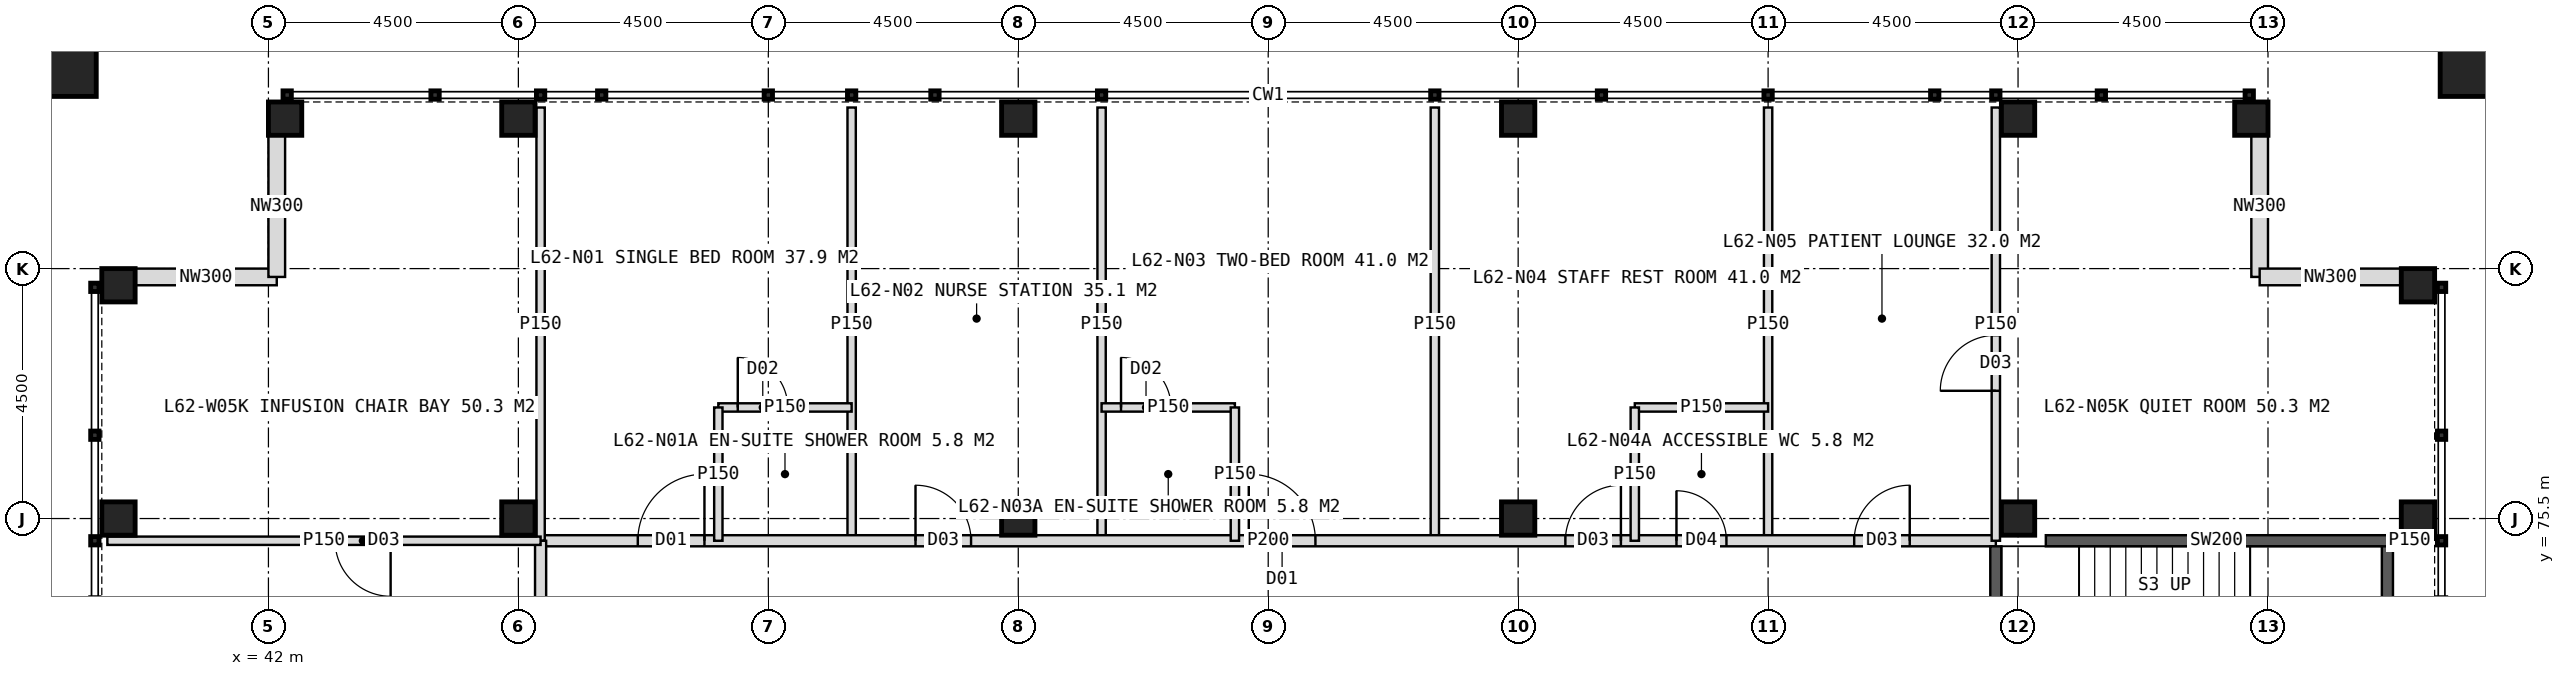
"""IFC4 building model, lengths in metres.
Left out: names, types, materials, properties, quantities, classifications, styles, units other than length and angle.
Written with IfcOpenShell. Run it as: python <this file> out.ifc"""

import sys

from ifc_helpers import new_model, si_unit, direction, frame, frame_2d, origin, origin_2d, place, context, subcontext, project, spatial, rectangle, hollow_rectangle, extrude, element, fill, save


model = new_model("IFC4")
c1 = context("Model", 3, precision=1e-05, world=origin(), true_north=direction((0.0, 1.0)))
c2 = subcontext(c1, "Body", "Model", "MODEL_VIEW")
j1 = project(units=[si_unit("LENGTHUNIT", "METRE"), si_unit("PLANEANGLEUNIT", "RADIAN")], contexts=[c1])
p1 = place(None, origin())
s1 = spatial("IfcSite", under=j1, at=p1, CompositionType="ELEMENT")
p2 = place(p1, origin())
s2 = spatial("IfcBuilding", under=s1, at=p2, CompositionType="ELEMENT")
p3 = place(p2, frame((0.0, 0.0, 258.0)))
s3 = spatial("IfcBuildingStorey", under=s2, at=p3, CompositionType="ELEMENT", Elevation=258.0)
for number, where, z_axis, x_axis in (
    (1, (73.5, 75.5, 0.0), (0.0, 0.0, 1.0), (1.0, 0.0, 0.0)),
    (2, (46.5, 75.5, 0.0), (0.0, 0.0, 1.0), (1.0, 0.0, 0.0)),
    (3, (55.5, 75.5, 0.0), (0.0, 0.0, 1.0), (1.0, 0.0, 0.0)),
    (4, (64.5, 75.5, 0.0), (0.0, 0.0, 1.0), (1.0, 0.0, 0.0)),
    (5, (42.3, 82.7, 0.0), (0.0, 0.0, 1.0), (1.0, 0.0, 0.0)),
    (6, (46.5, 82.7, 0.0), (0.0, 0.0, 1.0), (1.0, 0.0, 0.0)),
    (7, (55.5, 82.7, 0.0), (0.0, 0.0, 1.0), (1.0, 0.0, 0.0)),
    (8, (64.5, 82.7, 0.0), (0.0, 0.0, 1.0), (1.0, 0.0, 0.0)),
    (9, (73.5, 82.7, 0.0), (0.0, 0.0, 1.0), (1.0, 0.0, 0.0)),
    (10, (39.3, 75.5, 0.0), (0.0, 0.0, 1.0), (1.0, 0.0, 0.0)),
    (11, (80.7, 75.5, 0.0), (0.0, 0.0, 1.0), (1.0, 0.0, 0.0)),
    (12, (77.7, 82.7, 0.0), (0.0, 0.0, 1.0), (1.0, 0.0, 0.0)),
    (13, (39.3, 79.7, 0.0), (0.0, 0.0, 1.0), (1.0, 0.0, 0.0)),
    (14, (80.7, 79.7, 0.0), (0.0, 0.0, 1.0), (1.0, 0.0, 0.0)),
):
    element("IfcColumn", number, at=place(p3, frame(where, z_axis=z_axis, x_axis=x_axis)), inside=s3, PredefinedType="COLUMN", context=c2, shape_type="SweptSolid", body=[
        extrude(hollow_rectangle(XDim=0.6, YDim=0.6, WallThickness=0.04, at=origin_2d()), origin(), (0.0, 0.0, 1.0), 4.0),
    ])
for number, where, z_axis, x_axis in (
    (15, (81.6, 83.6, 0.0), (0.0, 0.0, 1.0), (1.0, 0.0, 0.0)),
    (16, (38.4, 83.6, 0.0), (0.0, 0.0, 1.0), (1.0, 0.0, 0.0)),
):
    element("IfcColumn", number, at=place(p3, frame(where, z_axis=z_axis, x_axis=x_axis)), inside=s3, PredefinedType="COLUMN", context=c2, shape_type="SweptSolid", body=[
        extrude(hollow_rectangle(XDim=1.0, YDim=1.0, WallThickness=0.06, at=origin_2d()), origin(), (0.0, 0.0, 1.0), 4.0),
    ])
for number, where, z_axis, x_axis in (
    (17, (77.85, 82.4, 0.0), (0.0, 0.0, 1.0), (0.0, -1.0, 0.0)),
    (18, (77.85, 79.85, 0.0), (0.0, 0.0, 1.0), (1.0, 0.0, 0.0)),
    (19, (39.6, 79.85, 0.0), (0.0, 0.0, 1.0), (1.0, 0.0, 0.0)),
    (20, (42.15, 79.85, 0.0), (0.0, 0.0, 1.0), (0.0, 1.0, 0.0)),
):
    element("IfcWall", number, at=place(p3, frame(where, z_axis=z_axis, x_axis=x_axis)), inside=s3, PredefinedType="ELEMENTEDWALL", context=c2, shape_type="SweptSolid", body=[
        extrude(rectangle(XDim=2.55, YDim=0.3, at=frame_2d((1.275, 0.0))), origin(), (0.0, 0.0, 1.0), 2.95),
    ])
for number, where, z_axis, x_axis in (
    (21, (52.5, 75.1, 0.0), (0.0, 0.0, 1.0), (0.0, 1.0, 0.0)),
    (22, (57.0, 75.1, 0.0), (0.0, 0.0, 1.0), (0.0, 1.0, 0.0)),
    (23, (63.0, 75.1, 0.0), (0.0, 0.0, 1.0), (0.0, 1.0, 0.0)),
    (24, (69.0, 75.1, 0.0), (0.0, 0.0, 1.0), (0.0, 1.0, 0.0)),
):
    element("IfcWall", number, at=place(p3, frame(where, z_axis=z_axis, x_axis=x_axis)), inside=s3, PredefinedType="PARTITIONING", context=c2, shape_type="SweptSolid", body=[
        extrude(rectangle(XDim=7.8, YDim=0.15, at=frame_2d((3.9, 0.0))), origin(), (0.0, 0.0, 1.0), 3.75),
    ])
p4 = place(p3, frame((46.9, 75.1, 0.0), z_axis=(0.0, 0.0, 1.0), x_axis=(1.0, 0.0, 0.0)))
e25 = element("IfcWall", 25, at=p4, inside=s3, PredefinedType="PARTITIONING", context=c2, shape_type="SweptSolid", body=[
    extrude(rectangle(XDim=26.2, YDim=0.2, at=frame_2d((13.1, 0.0))), origin(), (0.0, 0.0, 1.0), 3.75),
])
p5 = place(p4, frame((1.75, 0.0, 0.0)))
e26 = element("IfcOpeningElement", 26, at=p5, cuts=e25, PredefinedType="OPENING", context=c2, shape_type="SweptSolid", body=[
    extrude(rectangle(XDim=1.2, YDim=2.2, at=frame_2d((0.6, 1.1))), frame((0.0, 0.11, 0.0), z_axis=(0.0, -1.0, 0.0), x_axis=(1.0, 0.0, 0.0)), (0.0, 0.0, 1.0), 0.22),
])
p6 = place(p4, frame((6.75, 0.0, 0.0)))
e27 = element("IfcOpeningElement", 27, at=p6, cuts=e25, PredefinedType="OPENING", context=c2, shape_type="SweptSolid", body=[
    extrude(rectangle(XDim=1.0, YDim=2.1, at=frame_2d((0.5, 1.05))), frame((0.0, 0.11, 0.0), z_axis=(0.0, -1.0, 0.0), x_axis=(1.0, 0.0, 0.0)), (0.0, 0.0, 1.0), 0.22),
])
p7 = place(p4, frame((12.75, 0.0, 0.0)))
e28 = element("IfcOpeningElement", 28, at=p7, cuts=e25, PredefinedType="OPENING", context=c2, shape_type="SweptSolid", body=[
    extrude(rectangle(XDim=1.2, YDim=2.2, at=frame_2d((0.6, 1.1))), frame((0.0, 0.11, 0.0), z_axis=(0.0, -1.0, 0.0), x_axis=(1.0, 0.0, 0.0)), (0.0, 0.0, 1.0), 0.22),
])
p8 = place(p4, frame((20.45, 0.0, 0.0)))
e29 = element("IfcOpeningElement", 29, at=p8, cuts=e25, PredefinedType="OPENING", context=c2, shape_type="SweptSolid", body=[
    extrude(rectangle(XDim=0.9, YDim=2.1, at=frame_2d((0.45, 1.05))), frame((0.0, 0.11, 0.0), z_axis=(0.0, -1.0, 0.0), x_axis=(1.0, 0.0, 0.0)), (0.0, 0.0, 1.0), 0.22),
])
p9 = place(p4, frame((18.45, 0.0, 0.0)))
e30 = element("IfcOpeningElement", 30, at=p9, cuts=e25, PredefinedType="OPENING", context=c2, shape_type="SweptSolid", body=[
    extrude(rectangle(XDim=1.0, YDim=2.1, at=frame_2d((0.5, 1.05))), frame((0.0, 0.11, 0.0), z_axis=(0.0, -1.0, 0.0), x_axis=(1.0, 0.0, 0.0)), (0.0, 0.0, 1.0), 0.22),
])
p10 = place(p4, frame((23.65, 0.0, 0.0)))
e31 = element("IfcOpeningElement", 31, at=p10, cuts=e25, PredefinedType="OPENING", context=c2, shape_type="SweptSolid", body=[
    extrude(rectangle(XDim=1.0, YDim=2.1, at=frame_2d((0.5, 1.05))), frame((0.0, 0.11, 0.0), z_axis=(0.0, -1.0, 0.0), x_axis=(1.0, 0.0, 0.0)), (0.0, 0.0, 1.0), 0.22),
])
p11 = place(p3, frame((46.9, 75.1, 0.0), z_axis=(0.0, 0.0, 1.0), x_axis=(0.0, 1.0, 0.0)))
e32 = element("IfcWall", 32, at=p11, inside=s3, PredefinedType="PARTITIONING", context=c2, shape_type="SweptSolid", body=[
    extrude(rectangle(XDim=7.8, YDim=0.15, at=frame_2d((3.9, 0.0))), origin(), (0.0, 0.0, 1.0), 3.75),
])
p12 = place(p3, frame((50.1, 77.5, 0.0), z_axis=(0.0, 0.0, 1.0), x_axis=(1.0, 0.0, 0.0)))
e33 = element("IfcWall", 33, at=p12, inside=s3, PredefinedType="PARTITIONING", context=c2, shape_type="SweptSolid", body=[
    extrude(rectangle(XDim=2.4, YDim=0.15, at=frame_2d((1.2, 0.0))), origin(), (0.0, 0.0, 1.0), 3.75),
])
p13 = place(p12, frame((0.35, 0.0, 0.0)))
e34 = element("IfcOpeningElement", 34, at=p13, cuts=e33, PredefinedType="OPENING", context=c2, shape_type="SweptSolid", body=[
    extrude(rectangle(XDim=0.9, YDim=2.1, at=frame_2d((0.45, 1.05))), frame((0.0, 0.085, 0.0), z_axis=(0.0, -1.0, 0.0), x_axis=(1.0, 0.0, 0.0)), (0.0, 0.0, 1.0), 0.17),
])
p14 = place(p3, frame((50.1, 75.1, 0.0), z_axis=(0.0, 0.0, 1.0), x_axis=(0.0, 1.0, 0.0)))
e35 = element("IfcWall", 35, at=p14, inside=s3, PredefinedType="PARTITIONING", context=c2, shape_type="SweptSolid", body=[
    extrude(rectangle(XDim=2.4, YDim=0.15, at=frame_2d((1.2, 0.0))), origin(), (0.0, 0.0, 1.0), 3.75),
])
p15 = place(p3, frame((57.0, 77.5, 0.0), z_axis=(0.0, 0.0, 1.0), x_axis=(1.0, 0.0, 0.0)))
e36 = element("IfcWall", 36, at=p15, inside=s3, PredefinedType="PARTITIONING", context=c2, shape_type="SweptSolid", body=[
    extrude(rectangle(XDim=2.4, YDim=0.15, at=frame_2d((1.2, 0.0))), origin(), (0.0, 0.0, 1.0), 3.75),
])
p16 = place(p15, frame((0.35, 0.0, 0.0)))
e37 = element("IfcOpeningElement", 37, at=p16, cuts=e36, PredefinedType="OPENING", context=c2, shape_type="SweptSolid", body=[
    extrude(rectangle(XDim=0.9, YDim=2.1, at=frame_2d((0.45, 1.05))), frame((0.0, 0.085, 0.0), z_axis=(0.0, -1.0, 0.0), x_axis=(1.0, 0.0, 0.0)), (0.0, 0.0, 1.0), 0.17),
])
for number, where, z_axis, x_axis in (
    (38, (59.4, 75.1, 0.0), (0.0, 0.0, 1.0), (0.0, 1.0, 0.0)),
    (39, (66.6, 77.5, 0.0), (0.0, 0.0, 1.0), (1.0, 0.0, 0.0)),
    (40, (66.6, 75.1, 0.0), (0.0, 0.0, 1.0), (0.0, 1.0, 0.0)),
):
    element("IfcWall", number, at=place(p3, frame(where, z_axis=z_axis, x_axis=x_axis)), inside=s3, PredefinedType="PARTITIONING", context=c2, shape_type="SweptSolid", body=[
        extrude(rectangle(XDim=2.4, YDim=0.15, at=frame_2d((1.2, 0.0))), origin(), (0.0, 0.0, 1.0), 3.75),
    ])
p17 = place(p3, frame((73.1, 75.1, 0.0), z_axis=(0.0, 0.0, 1.0), x_axis=(0.0, 1.0, 0.0)))
e41 = element("IfcWall", 41, at=p17, inside=s3, PredefinedType="PARTITIONING", context=c2, shape_type="SweptSolid", body=[
    extrude(rectangle(XDim=7.8, YDim=0.15, at=frame_2d((3.9, 0.0))), origin(), (0.0, 0.0, 1.0), 3.75),
])
p18 = place(p17, frame((2.7, 0.0, 0.0)))
e42 = element("IfcOpeningElement", 42, at=p18, cuts=e41, PredefinedType="OPENING", context=c2, shape_type="SweptSolid", body=[
    extrude(rectangle(XDim=1.0, YDim=2.1, at=frame_2d((0.5, 1.05))), frame((0.0, 0.085, 0.0), z_axis=(0.0, -1.0, 0.0), x_axis=(1.0, 0.0, 0.0)), (0.0, 0.0, 1.0), 0.17),
])
p19 = place(p3, frame((46.9, 48.9, 0.0), z_axis=(0.0, 0.0, 1.0), x_axis=(0.0, 1.0, 0.0)))
e43 = element("IfcWall", 43, at=p19, inside=s3, PredefinedType="PARTITIONING", context=c2, shape_type="SweptSolid", body=[
    extrude(rectangle(XDim=26.2, YDim=0.2, at=frame_2d((13.1, 0.0))), origin(), (0.0, 0.0, 1.0), 3.75),
])
p20 = place(p19, frame((1.75, 0.0, 0.0)))
e44 = element("IfcOpeningElement", 44, at=p20, cuts=e43, PredefinedType="OPENING", context=c2, shape_type="SweptSolid", body=[
    extrude(rectangle(XDim=1.2, YDim=2.2, at=frame_2d((0.6, 1.1))), frame((0.0, 0.11, 0.0), z_axis=(0.0, -1.0, 0.0), x_axis=(1.0, 0.0, 0.0)), (0.0, 0.0, 1.0), 0.22),
])
p21 = place(p19, frame((6.75, 0.0, 0.0)))
e45 = element("IfcOpeningElement", 45, at=p21, cuts=e43, PredefinedType="OPENING", context=c2, shape_type="SweptSolid", body=[
    extrude(rectangle(XDim=1.0, YDim=2.1, at=frame_2d((0.5, 1.05))), frame((0.0, 0.11, 0.0), z_axis=(0.0, -1.0, 0.0), x_axis=(1.0, 0.0, 0.0)), (0.0, 0.0, 1.0), 0.22),
])
p22 = place(p19, frame((11.1, 0.0, 0.0)))
e46 = element("IfcOpeningElement", 46, at=p22, cuts=e43, PredefinedType="OPENING", context=c2, shape_type="SweptSolid", body=[
    extrude(rectangle(XDim=1.0, YDim=2.1, at=frame_2d((0.5, 1.05))), frame((0.0, 0.11, 0.0), z_axis=(0.0, -1.0, 0.0), x_axis=(1.0, 0.0, 0.0)), (0.0, 0.0, 1.0), 0.22),
])
p23 = place(p19, frame((18.45, 0.0, 0.0)))
e47 = element("IfcOpeningElement", 47, at=p23, cuts=e43, PredefinedType="OPENING", context=c2, shape_type="SweptSolid", body=[
    extrude(rectangle(XDim=1.2, YDim=2.2, at=frame_2d((0.6, 1.1))), frame((0.0, 0.11, 0.0), z_axis=(0.0, -1.0, 0.0), x_axis=(1.0, 0.0, 0.0)), (0.0, 0.0, 1.0), 0.22),
])
p24 = place(p19, frame((23.25, 0.0, 0.0)))
e48 = element("IfcOpeningElement", 48, at=p24, cuts=e43, PredefinedType="OPENING", context=c2, shape_type="SweptSolid", body=[
    extrude(rectangle(XDim=1.2, YDim=2.2, at=frame_2d((0.6, 1.1))), frame((0.0, 0.11, 0.0), z_axis=(0.0, -1.0, 0.0), x_axis=(1.0, 0.0, 0.0)), (0.0, 0.0, 1.0), 0.22),
])
p25 = place(p3, frame((46.9, 75.1, 0.0), z_axis=(0.0, 0.0, 1.0), x_axis=(-1.0, 0.0, 0.0)))
e49 = element("IfcWall", 49, at=p25, inside=s3, PredefinedType="PARTITIONING", context=c2, shape_type="SweptSolid", body=[
    extrude(rectangle(XDim=7.8, YDim=0.15, at=frame_2d((3.9, 0.0))), origin(), (0.0, 0.0, 1.0), 3.75),
])
p26 = place(p25, frame((2.7, 0.0, 0.0)))
e50 = element("IfcOpeningElement", 50, at=p26, cuts=e49, PredefinedType="OPENING", context=c2, shape_type="SweptSolid", body=[
    extrude(rectangle(XDim=1.0, YDim=2.1, at=frame_2d((0.5, 1.05))), frame((0.0, 0.085, 0.0), z_axis=(0.0, -1.0, 0.0), x_axis=(1.0, 0.0, 0.0)), (0.0, 0.0, 1.0), 0.17),
])
p27 = place(p3, frame((80.2, 75.1, 0.0), z_axis=(0.0, 0.0, 1.0), x_axis=(1.0, 0.0, 0.0)))
e51 = element("IfcWall", 51, at=p27, inside=s3, PredefinedType="PARTITIONING", context=c2, shape_type="SweptSolid", body=[
    extrude(rectangle(XDim=0.7, YDim=0.15, at=frame_2d((0.35, 0.0))), origin(), (0.0, 0.0, 1.0), 3.75),
])
p28 = place(p3, frame((73.1, 75.0, 0.0), z_axis=(0.0, 0.0, 1.0), x_axis=(0.0, -1.0, 0.0)))
e52 = element("IfcWall", 52, at=p28, inside=s3, PredefinedType="SOLIDWALL", context=c2, shape_type="SweptSolid", body=[
    extrude(rectangle(XDim=4.0, YDim=0.2, at=frame_2d((2.0, 0.0))), origin(), (0.0, 0.0, 1.0), 3.75),
])
p29 = place(p28, frame((1.5, 0.0, 0.0)))
e53 = element("IfcOpeningElement", 53, at=p29, cuts=e52, PredefinedType="OPENING", context=c2, shape_type="SweptSolid", body=[
    extrude(rectangle(XDim=1.2, YDim=2.1, at=frame_2d((0.6, 1.05))), frame((0.0, 0.11, 0.0), z_axis=(0.0, -1.0, 0.0), x_axis=(1.0, 0.0, 0.0)), (0.0, 0.0, 1.0), 0.22),
])
p30 = place(p3, frame((80.15, 71.0, 0.0), z_axis=(0.0, 0.0, 1.0), x_axis=(0.0, 1.0, 0.0)))
e54 = element("IfcWall", 54, at=p30, inside=s3, PredefinedType="SOLIDWALL", context=c2, shape_type="SweptSolid", body=[
    extrude(rectangle(XDim=4.1, YDim=0.2, at=frame_2d((2.05, 0.0))), origin(), (0.0, 0.0, 1.0), 3.75),
])
p31 = place(p3, frame((74.0, 75.1, 0.0), z_axis=(0.0, 0.0, 1.0), x_axis=(1.0, 0.0, 0.0)))
e55 = element("IfcWall", 55, at=p31, inside=s3, PredefinedType="SOLIDWALL", context=c2, shape_type="SweptSolid", body=[
    extrude(rectangle(XDim=6.15, YDim=0.2, at=frame_2d((3.075, 0.0))), origin(), (0.0, 0.0, 1.0), 3.75),
])
p32 = place(p5, origin())
e56 = element("IfcDoor", 56, at=p32, inside=s3, OperationType="SINGLE_SWING_RIGHT", PredefinedType="DOOR", context=c2, shape_type="SweptSolid", body=[
    extrude(rectangle(XDim=1.2, YDim=2.2, at=frame_2d((0.6, 1.1))), frame((0.0, 0.025, 0.0), z_axis=(0.0, -1.0, 0.0), x_axis=(1.0, 0.0, 0.0)), (0.0, 0.0, 1.0), 0.05),
])
fill(e26, e56)
p33 = place(p13, origin())
e57 = element("IfcDoor", 57, at=p33, inside=s3, OperationType="SINGLE_SWING_LEFT", PredefinedType="DOOR", context=c2, shape_type="SweptSolid", body=[
    extrude(rectangle(XDim=0.9, YDim=2.1, at=frame_2d((0.45, 1.05))), frame((0.0, 0.025, 0.0), z_axis=(0.0, -1.0, 0.0), x_axis=(1.0, 0.0, 0.0)), (0.0, 0.0, 1.0), 0.05),
])
fill(e34, e57)
p34 = place(p6, origin())
e58 = element("IfcDoor", 58, at=p34, inside=s3, OperationType="SINGLE_SWING_LEFT", PredefinedType="DOOR", context=c2, shape_type="SweptSolid", body=[
    extrude(rectangle(XDim=1.0, YDim=2.1, at=frame_2d((0.5, 1.05))), frame((0.0, 0.025, 0.0), z_axis=(0.0, -1.0, 0.0), x_axis=(1.0, 0.0, 0.0)), (0.0, 0.0, 1.0), 0.05),
])
fill(e27, e58)
p35 = place(p7, origin())
e59 = element("IfcDoor", 59, at=p35, inside=s3, OperationType="SINGLE_SWING_LEFT", PredefinedType="DOOR", context=c2, shape_type="SweptSolid", body=[
    extrude(rectangle(XDim=1.2, YDim=2.2, at=frame_2d((0.6, 1.1))), frame((0.0, 0.025, 0.0), z_axis=(0.0, -1.0, 0.0), x_axis=(1.0, 0.0, 0.0)), (0.0, 0.0, 1.0), 0.05),
])
fill(e28, e59)
p36 = place(p16, origin())
e60 = element("IfcDoor", 60, at=p36, inside=s3, OperationType="SINGLE_SWING_LEFT", PredefinedType="DOOR", context=c2, shape_type="SweptSolid", body=[
    extrude(rectangle(XDim=0.9, YDim=2.1, at=frame_2d((0.45, 1.05))), frame((0.0, 0.025, 0.0), z_axis=(0.0, -1.0, 0.0), x_axis=(1.0, 0.0, 0.0)), (0.0, 0.0, 1.0), 0.05),
])
fill(e37, e60)
p37 = place(p8, origin())
e61 = element("IfcDoor", 61, at=p37, inside=s3, OperationType="SINGLE_SWING_LEFT", PredefinedType="DOOR", context=c2, shape_type="SweptSolid", body=[
    extrude(rectangle(XDim=0.9, YDim=2.1, at=frame_2d((0.45, 1.05))), frame((0.0, 0.025, 0.0), z_axis=(0.0, -1.0, 0.0), x_axis=(1.0, 0.0, 0.0)), (0.0, 0.0, 1.0), 0.05),
])
fill(e29, e61)
p38 = place(p9, origin())
e62 = element("IfcDoor", 62, at=p38, inside=s3, OperationType="SINGLE_SWING_RIGHT", PredefinedType="DOOR", context=c2, shape_type="SweptSolid", body=[
    extrude(rectangle(XDim=1.0, YDim=2.1, at=frame_2d((0.5, 1.05))), frame((0.0, 0.025, 0.0), z_axis=(0.0, -1.0, 0.0), x_axis=(1.0, 0.0, 0.0)), (0.0, 0.0, 1.0), 0.05),
])
fill(e30, e62)
p39 = place(p18, origin())
e63 = element("IfcDoor", 63, at=p39, inside=s3, OperationType="SINGLE_SWING_LEFT", PredefinedType="DOOR", context=c2, shape_type="SweptSolid", body=[
    extrude(rectangle(XDim=1.0, YDim=2.1, at=frame_2d((0.5, 1.05))), frame((0.0, 0.025, 0.0), z_axis=(0.0, -1.0, 0.0), x_axis=(1.0, 0.0, 0.0)), (0.0, 0.0, 1.0), 0.05),
])
fill(e42, e63)
p40 = place(p10, origin())
e64 = element("IfcDoor", 64, at=p40, inside=s3, OperationType="SINGLE_SWING_RIGHT", PredefinedType="DOOR", context=c2, shape_type="SweptSolid", body=[
    extrude(rectangle(XDim=1.0, YDim=2.1, at=frame_2d((0.5, 1.05))), frame((0.0, 0.025, 0.0), z_axis=(0.0, -1.0, 0.0), x_axis=(1.0, 0.0, 0.0)), (0.0, 0.0, 1.0), 0.05),
])
fill(e31, e64)
p41 = place(p26, origin())
e65 = element("IfcDoor", 65, at=p41, inside=s3, OperationType="SINGLE_SWING_LEFT", PredefinedType="DOOR", context=c2, shape_type="SweptSolid", body=[
    extrude(rectangle(XDim=1.0, YDim=2.1, at=frame_2d((0.5, 1.05))), frame((0.0, 0.025, 0.0), z_axis=(0.0, -1.0, 0.0), x_axis=(1.0, 0.0, 0.0)), (0.0, 0.0, 1.0), 0.05),
])
fill(e50, e65)
save(model, sys.argv[1])
